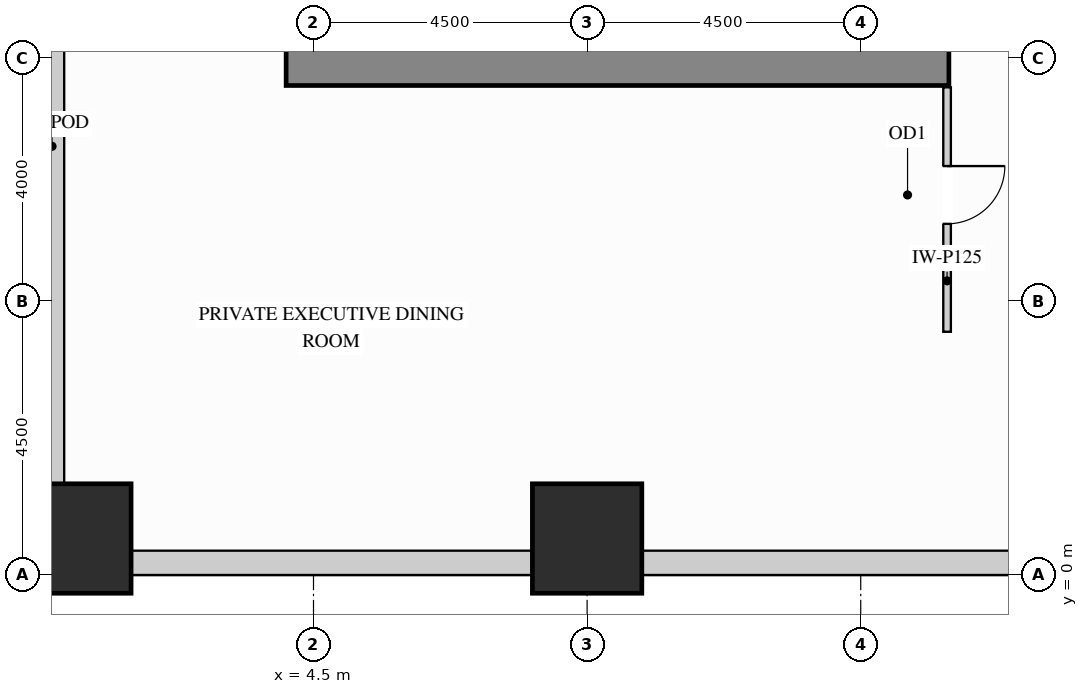
"""IFC4 building model, lengths in metres.
Left out: names, types, materials, properties, quantities, classifications, styles, units other than length and angle.
Written with IfcOpenShell. Run it as: python <this file> out.ifc"""

import sys

from ifc_helpers import new_model, si_unit, direction, frame, frame_2d, origin, origin_2d, place, context, subcontext, project, spatial, rectangle, extrude, source, transform, mapped, element, fill, save


model = new_model("IFC4")
c1 = context("Model", 3, precision=1e-05, world=origin(), true_north=direction((0.0, 1.0)))
c2 = subcontext(c1, "Body", "Model", "MODEL_VIEW")
j1 = project(units=[si_unit("LENGTHUNIT", "METRE"), si_unit("PLANEANGLEUNIT", "RADIAN")], contexts=[c1])
p1 = place(None, origin())
s1 = spatial("IfcSite", under=j1, at=p1, CompositionType="ELEMENT")
p2 = place(p1, origin())
s2 = spatial("IfcBuilding", under=s1, at=p2, CompositionType="ELEMENT")
p3 = place(p2, frame((0.0, 0.0, 18.0)))
s3 = spatial("IfcBuildingStorey", under=s2, at=p3, CompositionType="ELEMENT", Elevation=18.0)
m1 = source(origin(), c2, "Body", "SweptSolid", [
    extrude(rectangle(XDim=1.8, YDim=1.8, at=origin_2d()), origin(), (0.0, 0.0, 1.0), 4.28),
])
for number, where, z_axis, x_axis in (
    (1, (0.6, 0.6, 0.0), (0.0, 0.0, 1.0), (1.0, 0.0, 0.0)),
    (2, (9.0, 0.6, 0.0), (0.0, 0.0, 1.0), (1.0, 0.0, 0.0)),
):
    element("IfcColumn", number, at=place(p3, frame(where, z_axis=z_axis, x_axis=x_axis)), inside=s3, PredefinedType="COLUMN", context=c2, shape_type="MappedRepresentation", body=[
        mapped(m1, transform((0.0, 0.0, 0.0), x_axis=(1.0, 0.0, 0.0), y_axis=(0.0, 1.0, 0.0), z_axis=(0.0, 0.0, 1.0))),
    ])
m2 = source(origin(), c2, "Body", "SweptSolid", [
    extrude(rectangle(XDim=10.9, YDim=0.9, at=frame_2d((5.45, 0.0))), origin(), (0.0, 0.0, 1.0), 4.28),
])
p4 = place(p3, frame((4.05, 8.5, 0.0), z_axis=(0.0, 0.0, 1.0), x_axis=(1.0, 0.0, 0.0)))
e3 = element("IfcWall", 3, at=p4, inside=s3, PredefinedType="SHEAR", context=c2, shape_type="MappedRepresentation", body=[
    mapped(m2, transform((0.0, 0.0, 0.0), x_axis=(1.0, 0.0, 0.0), y_axis=(0.0, 1.0, 0.0), z_axis=(0.0, 0.0, 1.0))),
])
m3 = source(origin(), c2, "Body", "SweptSolid", [
    extrude(rectangle(XDim=11.104, YDim=0.4, at=frame_2d((5.552, 0.0))), origin(), (0.0, 0.0, 1.0), 1.865),
])
p5 = place(p3, frame((0.2, 12.602, 0.0), z_axis=(0.0, 0.0, 1.0), x_axis=(0.0, -1.0, 0.0)))
e4 = element("IfcWall", 4, at=p5, inside=s3, PredefinedType="SOLIDWALL", context=c2, shape_type="MappedRepresentation", body=[
    mapped(m3, transform((0.0, 0.0, 0.0), x_axis=(1.0, 0.0, 0.0), y_axis=(0.0, 1.0, 0.0), z_axis=(0.0, 0.0, 1.0))),
])
m4 = source(origin(), c2, "Body", "SweptSolid", [
    extrude(rectangle(XDim=6.604, YDim=0.4, at=frame_2d((3.302, 0.0))), origin(), (0.0, 0.0, 1.0), 1.865),
])
p6 = place(p3, frame((1.498, 0.2, 0.0), z_axis=(0.0, 0.0, 1.0), x_axis=(1.0, 0.0, 0.0)))
e5 = element("IfcWall", 5, at=p6, inside=s3, PredefinedType="SOLIDWALL", context=c2, shape_type="MappedRepresentation", body=[
    mapped(m4, transform((0.0, 0.0, 0.0), x_axis=(1.0, 0.0, 0.0), y_axis=(0.0, 1.0, 0.0), z_axis=(0.0, 0.0, 1.0))),
])
m5 = source(origin(), c2, "Body", "SweptSolid", [
    extrude(rectangle(XDim=8.204, YDim=0.4, at=frame_2d((4.102, 0.0))), origin(), (0.0, 0.0, 1.0), 1.865),
])
p7 = place(p3, frame((9.898, 0.2, 0.0), z_axis=(0.0, 0.0, 1.0), x_axis=(1.0, 0.0, 0.0)))
e6 = element("IfcWall", 6, at=p7, inside=s3, PredefinedType="SOLIDWALL", context=c2, shape_type="MappedRepresentation", body=[
    mapped(m5, transform((0.0, 0.0, 0.0), x_axis=(1.0, 0.0, 0.0), y_axis=(0.0, 1.0, 0.0), z_axis=(0.0, 0.0, 1.0))),
])
p8 = place(p3, frame((14.92, 4.0, 0.0), z_axis=(0.0, 0.0, 1.0), x_axis=(0.0, 1.0, 0.0)))
e7 = element("IfcWall", 7, at=p8, inside=s3, PredefinedType="PARTITIONING", context=c2, shape_type="SweptSolid", body=[
    extrude(rectangle(XDim=4.02, YDim=0.125, at=frame_2d((2.01, 0.0))), origin(), (0.0, 0.0, 1.0), 4.265),
])
p9 = place(p8, frame((1.775, 0.0, 0.0)))
e8 = element("IfcOpeningElement", 8, at=p9, cuts=e7, PredefinedType="OPENING", context=c2, shape_type="SweptSolid", body=[
    extrude(rectangle(XDim=0.95, YDim=2.15, at=frame_2d((0.475, 1.075))), frame((0.0, 0.073, 0.0), z_axis=(0.0, -1.0, 0.0), x_axis=(1.0, 0.0, 0.0)), (0.0, 0.0, 1.0), 0.145),
])
m6 = source(origin(), c2, "Body", "SweptSolid", [
    extrude(rectangle(XDim=0.95, YDim=2.15, at=frame_2d((0.475, 1.075))), frame((0.0, 0.025, 0.0), z_axis=(0.0, -1.0, 0.0), x_axis=(1.0, 0.0, 0.0)), (0.0, 0.0, 1.0), 0.05),
])
p10 = place(p9, origin())
e9 = element("IfcDoor", 9, at=p10, inside=s3, OperationType="SINGLE_SWING_RIGHT", PredefinedType="DOOR", context=c2, shape_type="MappedRepresentation", body=[
    mapped(m6, transform((0.0, 0.0, 0.0), x_axis=(1.0, 0.0, 0.0), y_axis=(0.0, 1.0, 0.0), z_axis=(0.0, 0.0, 1.0))),
])
fill(e8, e9)
save(model, sys.argv[1])
